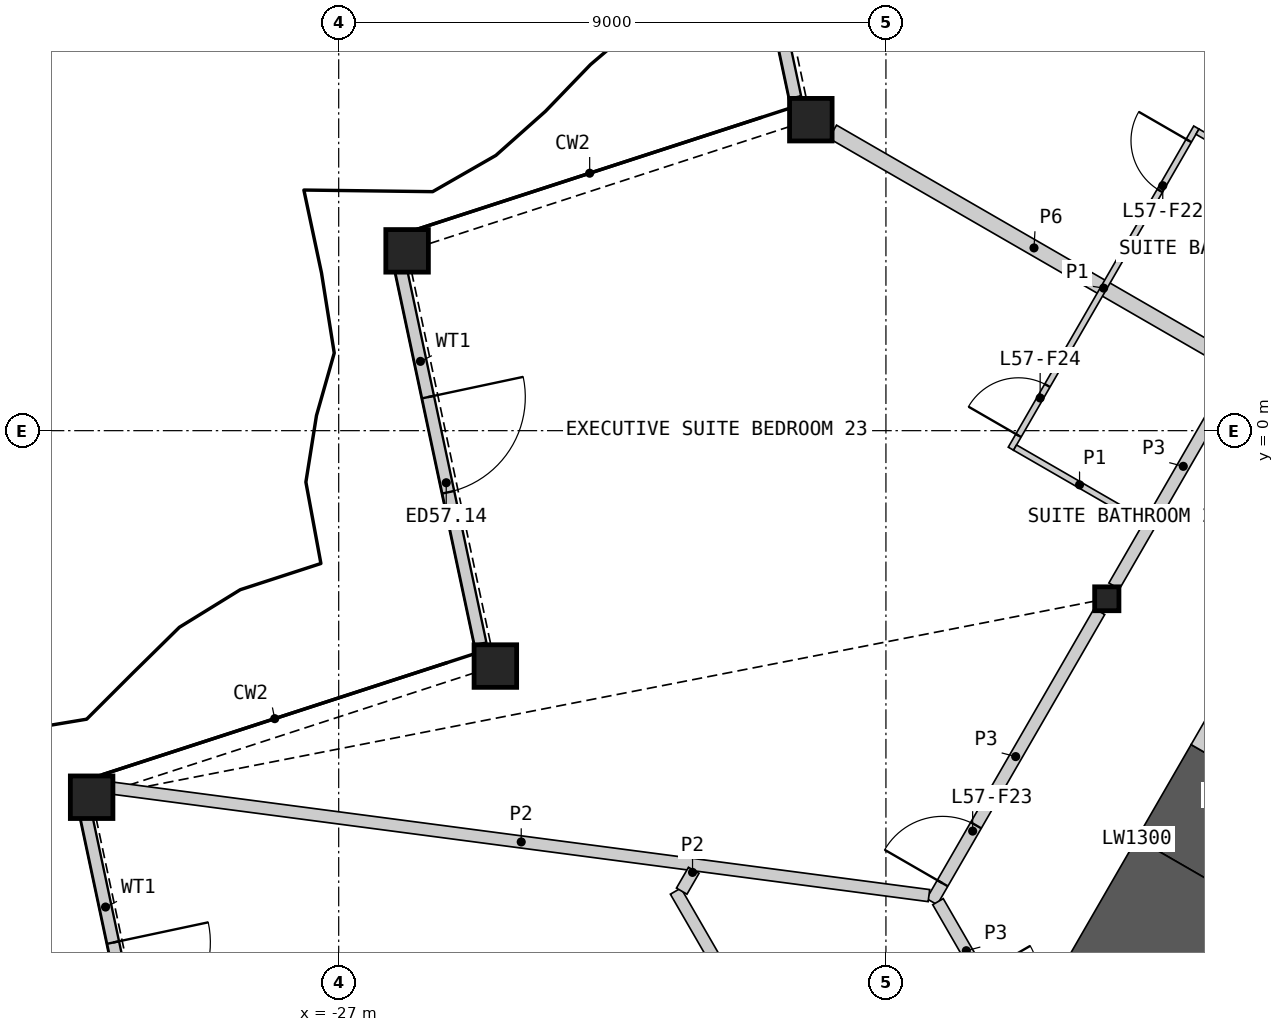
"""IFC4 building model, lengths in metres.
Left out: names, types, materials, properties, quantities, classifications, styles, units other than length and angle.
Written with IfcOpenShell. Run it as: python <this file> out.ifc"""

import sys

from ifc_helpers import new_model, si_unit, direction, frame, frame_2d, origin, origin_2d, place, context, subcontext, project, spatial, polyline, rectangle, hollow_rectangle, i_section, outline, extrude, element, fill, save


model = new_model("IFC4")
c1 = context("Model", 3, precision=1e-05, world=origin(), true_north=direction((0.0, 1.0)))
c2 = subcontext(c1, "Body", "Model", "MODEL_VIEW")
j1 = project(units=[si_unit("LENGTHUNIT", "METRE"), si_unit("PLANEANGLEUNIT", "RADIAN")], contexts=[c1])
p1 = place(None, origin())
s1 = spatial("IfcSite", under=j1, at=p1, CompositionType="ELEMENT")
p2 = place(p1, origin())
s2 = spatial("IfcBuilding", under=s1, at=p2, CompositionType="ELEMENT")
p3 = place(p2, frame((0.0, 0.0, 256.2)))
s3 = spatial("IfcBuildingStorey", under=s2, at=p3, CompositionType="ELEMENT", Elevation=256.2)
for number, where, z_axis, x_axis in (
    (1, (-19.235, 5.115, 0.0), (0.0, 0.0, 1.0), (1.0, 0.0, 0.0)),
    (2, (-25.875, 2.957, 0.0), (0.0, 0.0, 1.0), (1.0, 0.0, 0.0)),
    (3, (-24.423, -3.872, 0.0), (0.0, 0.0, 1.0), (1.0, 0.0, 0.0)),
    (4, (-31.063, -6.029, 0.0), (0.0, 0.0, 1.0), (1.0, 0.0, 0.0)),
):
    element("IfcColumn", number, at=place(p3, frame(where, z_axis=z_axis, x_axis=x_axis)), inside=s3, PredefinedType="COLUMN", context=c2, shape_type="SweptSolid", body=[
        extrude(hollow_rectangle(XDim=0.7, YDim=0.7, WallThickness=0.045, at=origin_2d()), origin(), (0.0, 0.0, 1.0), 3.6),
    ])
p4 = place(p3, frame((-14.368, -2.765, 0.0), z_axis=(0.0, 0.0, 1.0), x_axis=(1.0, 0.0, 0.0)))
e5 = element("IfcColumn", 5, at=p4, inside=s3, PredefinedType="COLUMN", context=c2, shape_type="SweptSolid", body=[
    extrude(i_section(OverallWidth=0.399, OverallDepth=0.393, WebThickness=0.023, FlangeThickness=0.037, at=origin_2d()), origin(), (0.0, 0.0, 1.0), 3.6),
])
p5 = place(p3, frame((-20.805, 11.659, 0.0), z_axis=(0.0, 0.0, 1.0), x_axis=(0.207913305093, -0.978147257608, 0.0)))
e6 = element("IfcWall", 6, at=p5, inside=s3, PredefinedType="SOLIDWALL", context=c2, shape_type="SweptSolid", body=[
    extrude(rectangle(XDim=6.316, YDim=0.2, at=frame_2d((3.158, 0.0))), origin(), (0.0, 0.0, 1.0), 2.701),
])
p6 = place(p5, frame((2.184, 0.0, 0.0)))
e7 = element("IfcOpeningElement", 7, at=p6, cuts=e6, PredefinedType="OPENING", context=c2, shape_type="SweptSolid", body=[
    extrude(rectangle(XDim=1.6, YDim=2.4, at=frame_2d((0.8, 1.2))), frame((0.0, 0.11, 0.0), z_axis=(0.0, -1.0, 0.0), x_axis=(1.0, 0.0, 0.0)), (0.0, 0.0, 1.0), 0.22),
])
p7 = place(p3, frame((-25.985, 2.688, 0.0), z_axis=(0.0, 0.0, 1.0), x_axis=(0.207906715746, -0.978148658205, 0.0)))
e8 = element("IfcWall", 8, at=p7, inside=s3, PredefinedType="SOLIDWALL", context=c2, shape_type="SweptSolid", body=[
    extrude(rectangle(XDim=6.332, YDim=0.2, at=frame_2d((3.166, 0.0))), origin(), (0.0, 0.0, 1.0), 2.701),
])
p8 = place(p7, frame((2.184, 0.0, 0.0)))
e9 = element("IfcOpeningElement", 9, at=p8, cuts=e8, PredefinedType="OPENING", context=c2, shape_type="SweptSolid", body=[
    extrude(rectangle(XDim=1.6, YDim=2.4, at=frame_2d((0.8, 1.2))), frame((0.0, 0.11, 0.0), z_axis=(0.0, -1.0, 0.0), x_axis=(1.0, 0.0, 0.0)), (0.0, 0.0, 1.0), 0.22),
])
p9 = place(p3, frame((-31.164, -6.283, 0.0), z_axis=(0.0, 0.0, 1.0), x_axis=(0.207900158502, -0.978150051932, 0.0)))
e10 = element("IfcWall", 10, at=p9, inside=s3, PredefinedType="SOLIDWALL", context=c2, shape_type="SweptSolid", body=[
    extrude(rectangle(XDim=6.347, YDim=0.2, at=frame_2d((3.174, 0.0))), origin(), (0.0, 0.0, 1.0), 2.701),
])
p10 = place(p9, frame((2.184, 0.0, 0.0)))
e11 = element("IfcOpeningElement", 11, at=p10, cuts=e10, PredefinedType="OPENING", context=c2, shape_type="SweptSolid", body=[
    extrude(rectangle(XDim=1.6, YDim=2.4, at=frame_2d((0.8, 1.2))), frame((0.0, 0.11, 0.0), z_axis=(0.0, -1.0, 0.0), x_axis=(1.0, 0.0, 0.0)), (0.0, 0.0, 1.0), 0.22),
])
p11 = place(p3, frame((-12.418, -5.488, 0.0), z_axis=(0.0, 0.0, 1.0), x_axis=(-0.499931460552, -0.866064971437, 0.0)))
e12 = element("IfcWall", 12, at=p11, inside=s3, PredefinedType="SHEAR", context=c2, shape_type="SweptSolid", body=[
    extrude(rectangle(XDim=1.786, YDim=1.3, at=frame_2d((0.893, 0.0))), origin(), (0.0, 0.0, 1.0), 3.25),
])
p12 = place(p3, origin())
e13 = element("IfcWall", 13, at=p12, inside=s3, PredefinedType="SHEAR", context=c2, shape_type="SweptSolid", body=[
    extrude(outline(polyline([(-13.874, -6.71), (-12.748, -7.36), (-12.748, -8.66), (-15.0, -8.66), (-13.874, -6.71)])), origin(), (0.0, 0.0, 1.0), 3.25),
])
p13 = place(p3, frame((-11.318, -3.583, 0.0), z_axis=(0.0, 0.0, 1.0), x_axis=(-0.50002983664, -0.866008176907, 0.0)))
e14 = element("IfcWall", 14, at=p13, inside=s3, PredefinedType="SHEAR", context=c2, shape_type="SweptSolid", body=[
    extrude(rectangle(XDim=2.2, YDim=1.3, at=frame_2d((1.1, 0.0))), origin(), (0.0, 0.0, 1.0), 3.25),
])
p14 = place(p13, frame((0.65, 0.0, 0.0)))
e15 = element("IfcOpeningElement", 15, at=p14, cuts=e14, PredefinedType="OPENING", context=c2, shape_type="SweptSolid", body=[
    extrude(rectangle(XDim=1.0, YDim=2.1, at=frame_2d((0.5, 1.05))), frame((0.0, 0.66, 0.0), z_axis=(0.0, -1.0, 0.0), x_axis=(1.0, 0.0, 0.0)), (0.0, 0.0, 1.0), 1.32),
])
p15 = place(p3, frame((-14.247, -2.556, 0.0), z_axis=(0.0, 0.0, 1.0), x_axis=(0.49998193945, 0.866035830797, 0.0)))
e16 = element("IfcWall", 16, at=p15, inside=s3, PredefinedType="PARTITIONING", context=c2, shape_type="SweptSolid", body=[
    extrude(rectangle(XDim=9.094, YDim=0.2, at=frame_2d((4.547, 0.0))), origin(), (0.0, 0.0, 1.0), 3.25),
])
p16 = place(p3, frame((-18.875, 4.917, 0.0), z_axis=(0.0, 0.0, 1.0), x_axis=(0.866017519557, -0.500013655634, 0.0)))
e17 = element("IfcWall", 17, at=p16, inside=s3, PredefinedType="PARTITIONING", context=c2, shape_type="SweptSolid", body=[
    extrude(rectangle(XDim=7.644, YDim=0.25, at=frame_2d((3.822, 0.0))), origin(), (0.0, 0.0, 1.0), 2.404),
])
p17 = place(p3, frame((-17.244, -7.747, 0.0), z_axis=(0.0, 0.0, 1.0), x_axis=(0.500017753321, 0.866015153657, 0.0)))
e18 = element("IfcWall", 18, at=p17, inside=s3, PredefinedType="PARTITIONING", context=c2, shape_type="SweptSolid", body=[
    extrude(rectangle(XDim=5.51, YDim=0.2, at=frame_2d((2.755, 0.0))), origin(), (0.0, 0.0, 1.0), 3.25),
])
p18 = place(p17, frame((0.35, 0.0, 0.0)))
e19 = element("IfcOpeningElement", 19, at=p18, cuts=e18, PredefinedType="OPENING", context=c2, shape_type="SweptSolid", body=[
    extrude(rectangle(XDim=1.1, YDim=2.1, at=frame_2d((0.55, 1.05))), frame((0.0, 0.11, 0.0), z_axis=(0.0, -1.0, 0.0), x_axis=(1.0, 0.0, 0.0)), (0.0, 0.0, 1.0), 0.22),
])
p19 = place(p3, frame((-17.144, -7.747, 0.0), z_axis=(0.0, 0.0, 1.0), x_axis=(0.499958791762, -0.866049194065, 0.0)))
e20 = element("IfcWall", 20, at=p19, inside=s3, PredefinedType="PARTITIONING", context=c2, shape_type="SweptSolid", body=[
    extrude(rectangle(XDim=3.726, YDim=0.2, at=frame_2d((1.863, 0.0))), origin(), (0.0, 0.0, 1.0), 3.25),
])
p20 = place(p19, frame((1.388, 0.0, 0.0)))
e21 = element("IfcOpeningElement", 21, at=p20, cuts=e20, PredefinedType="OPENING", context=c2, shape_type="SweptSolid", body=[
    extrude(rectangle(XDim=0.95, YDim=2.1, at=frame_2d((0.475, 1.05))), frame((0.0, 0.11, 0.0), z_axis=(0.0, -1.0, 0.0), x_axis=(1.0, 0.0, 0.0)), (0.0, 0.0, 1.0), 0.22),
])
p21 = place(p3, frame((-30.703, -5.882, 0.0), z_axis=(0.0, 0.0, 1.0), x_axis=(0.991445815272, -0.130518946443, 0.0)))
e22 = element("IfcWall", 22, at=p21, inside=s3, PredefinedType="PARTITIONING", context=c2, shape_type="SweptSolid", body=[
    extrude(rectangle(XDim=13.526, YDim=0.2, at=frame_2d((6.763, 0.0))), origin(), (0.0, 0.0, 1.0), 2.404),
])
p22 = place(p3, frame((-21.458, -7.574, 0.0), z_axis=(0.0, 0.0, 1.0), x_axis=(0.499973304129, -0.866040816104, 0.0)))
e23 = element("IfcWall", 23, at=p22, inside=s3, PredefinedType="PARTITIONING", context=c2, shape_type="SweptSolid", body=[
    extrude(rectangle(XDim=4.184, YDim=0.2, at=frame_2d((2.092, 0.0))), origin(), (0.0, 0.0, 1.0), 2.404),
])
p23 = place(p3, frame((-21.359, -7.574, 0.0), z_axis=(0.0, 0.0, 1.0), x_axis=(0.499989616998, 0.866031398331, 0.0)))
e24 = element("IfcWall", 24, at=p23, inside=s3, PredefinedType="PARTITIONING", context=c2, shape_type="SweptSolid", body=[
    extrude(rectangle(XDim=0.396, YDim=0.2, at=frame_2d((0.198, 0.0))), origin(), (0.0, 0.0, 1.0), 2.404),
])
p24 = place(p3, frame((-15.945, -0.297, 0.0), z_axis=(0.0, 0.0, 1.0), x_axis=(0.499978833458, 0.866037623948, 0.0)))
e25 = element("IfcWall", 25, at=p24, inside=s3, PredefinedType="PARTITIONING", context=c2, shape_type="SweptSolid", body=[
    extrude(rectangle(XDim=6.1, YDim=0.1, at=frame_2d((3.05, 0.0))), origin(), (0.0, 0.0, 1.0), 2.404),
])
p25 = place(p24, frame((4.9, 0.0, 0.0)))
e26 = element("IfcOpeningElement", 26, at=p25, cuts=e25, PredefinedType="OPENING", context=c2, shape_type="SweptSolid", body=[
    extrude(rectangle(XDim=0.95, YDim=2.1, at=frame_2d((0.475, 1.05))), frame((0.0, 0.06, 0.0), z_axis=(0.0, -1.0, 0.0), x_axis=(1.0, 0.0, 0.0)), (0.0, 0.0, 1.0), 0.12),
])
p26 = place(p24, frame((0.25, 0.0, 0.0)))
e27 = element("IfcOpeningElement", 27, at=p26, cuts=e25, PredefinedType="OPENING", context=c2, shape_type="SweptSolid", body=[
    extrude(rectangle(XDim=0.95, YDim=2.1, at=frame_2d((0.475, 1.05))), frame((0.0, 0.06, 0.0), z_axis=(0.0, -1.0, 0.0), x_axis=(1.0, 0.0, 0.0)), (0.0, 0.0, 1.0), 0.12),
])
for number, where, z_axis, x_axis in (
    (28, (-12.877, 4.917, 0.0), (0.0, 0.0, 1.0), (0.866, -0.5, 0.0)),
    (29, (-15.877, -0.279, 0.0), (0.0, 0.0, 1.0), (0.866, -0.5, 0.0)),
):
    element("IfcWall", number, at=place(p3, frame(where, z_axis=z_axis, x_axis=x_axis)), inside=s3, PredefinedType="PARTITIONING", context=c2, shape_type="SweptSolid", body=[
        extrude(rectangle(XDim=2.45, YDim=0.1, at=frame_2d((1.225, 0.0))), origin(), (0.0, 0.0, 1.0), 2.404),
    ])
p27 = place(p8, origin())
e30 = element("IfcDoor", 30, at=p27, inside=s3, OperationType="DOUBLE_DOOR_SINGLE_SWING", PredefinedType="DOOR", context=c2, shape_type="SweptSolid", body=[
    extrude(rectangle(XDim=1.6, YDim=2.4, at=frame_2d((0.8, 1.2))), frame((0.0, 0.025, 0.0), z_axis=(0.0, -1.0, 0.0), x_axis=(1.0, 0.0, 0.0)), (0.0, 0.0, 1.0), 0.05),
])
fill(e9, e30)
p28 = place(p10, origin())
e31 = element("IfcDoor", 31, at=p28, inside=s3, OperationType="DOUBLE_DOOR_SINGLE_SWING", PredefinedType="DOOR", context=c2, shape_type="SweptSolid", body=[
    extrude(rectangle(XDim=1.6, YDim=2.4, at=frame_2d((0.8, 1.2))), frame((0.0, 0.025, 0.0), z_axis=(0.0, -1.0, 0.0), x_axis=(1.0, 0.0, 0.0)), (0.0, 0.0, 1.0), 0.05),
])
fill(e11, e31)
p29 = place(p25, origin())
e32 = element("IfcDoor", 32, at=p29, inside=s3, OperationType="SINGLE_SWING_RIGHT", PredefinedType="DOOR", context=c2, shape_type="SweptSolid", body=[
    extrude(rectangle(XDim=0.95, YDim=2.1, at=frame_2d((0.475, 1.05))), frame((0.0, 0.025, 0.0), z_axis=(0.0, -1.0, 0.0), x_axis=(1.0, 0.0, 0.0)), (0.0, 0.0, 1.0), 0.05),
])
fill(e26, e32)
p30 = place(p18, origin())
e33 = element("IfcDoor", 33, at=p30, inside=s3, OperationType="SINGLE_SWING_LEFT", PredefinedType="DOOR", context=c2, shape_type="SweptSolid", body=[
    extrude(rectangle(XDim=1.1, YDim=2.1, at=frame_2d((0.55, 1.05))), frame((0.0, 0.025, 0.0), z_axis=(0.0, -1.0, 0.0), x_axis=(1.0, 0.0, 0.0)), (0.0, 0.0, 1.0), 0.05),
])
fill(e19, e33)
p31 = place(p26, origin())
e34 = element("IfcDoor", 34, at=p31, inside=s3, OperationType="SINGLE_SWING_LEFT", PredefinedType="DOOR", context=c2, shape_type="SweptSolid", body=[
    extrude(rectangle(XDim=0.95, YDim=2.1, at=frame_2d((0.475, 1.05))), frame((0.0, 0.025, 0.0), z_axis=(0.0, -1.0, 0.0), x_axis=(1.0, 0.0, 0.0)), (0.0, 0.0, 1.0), 0.05),
])
fill(e27, e34)
save(model, sys.argv[1])
